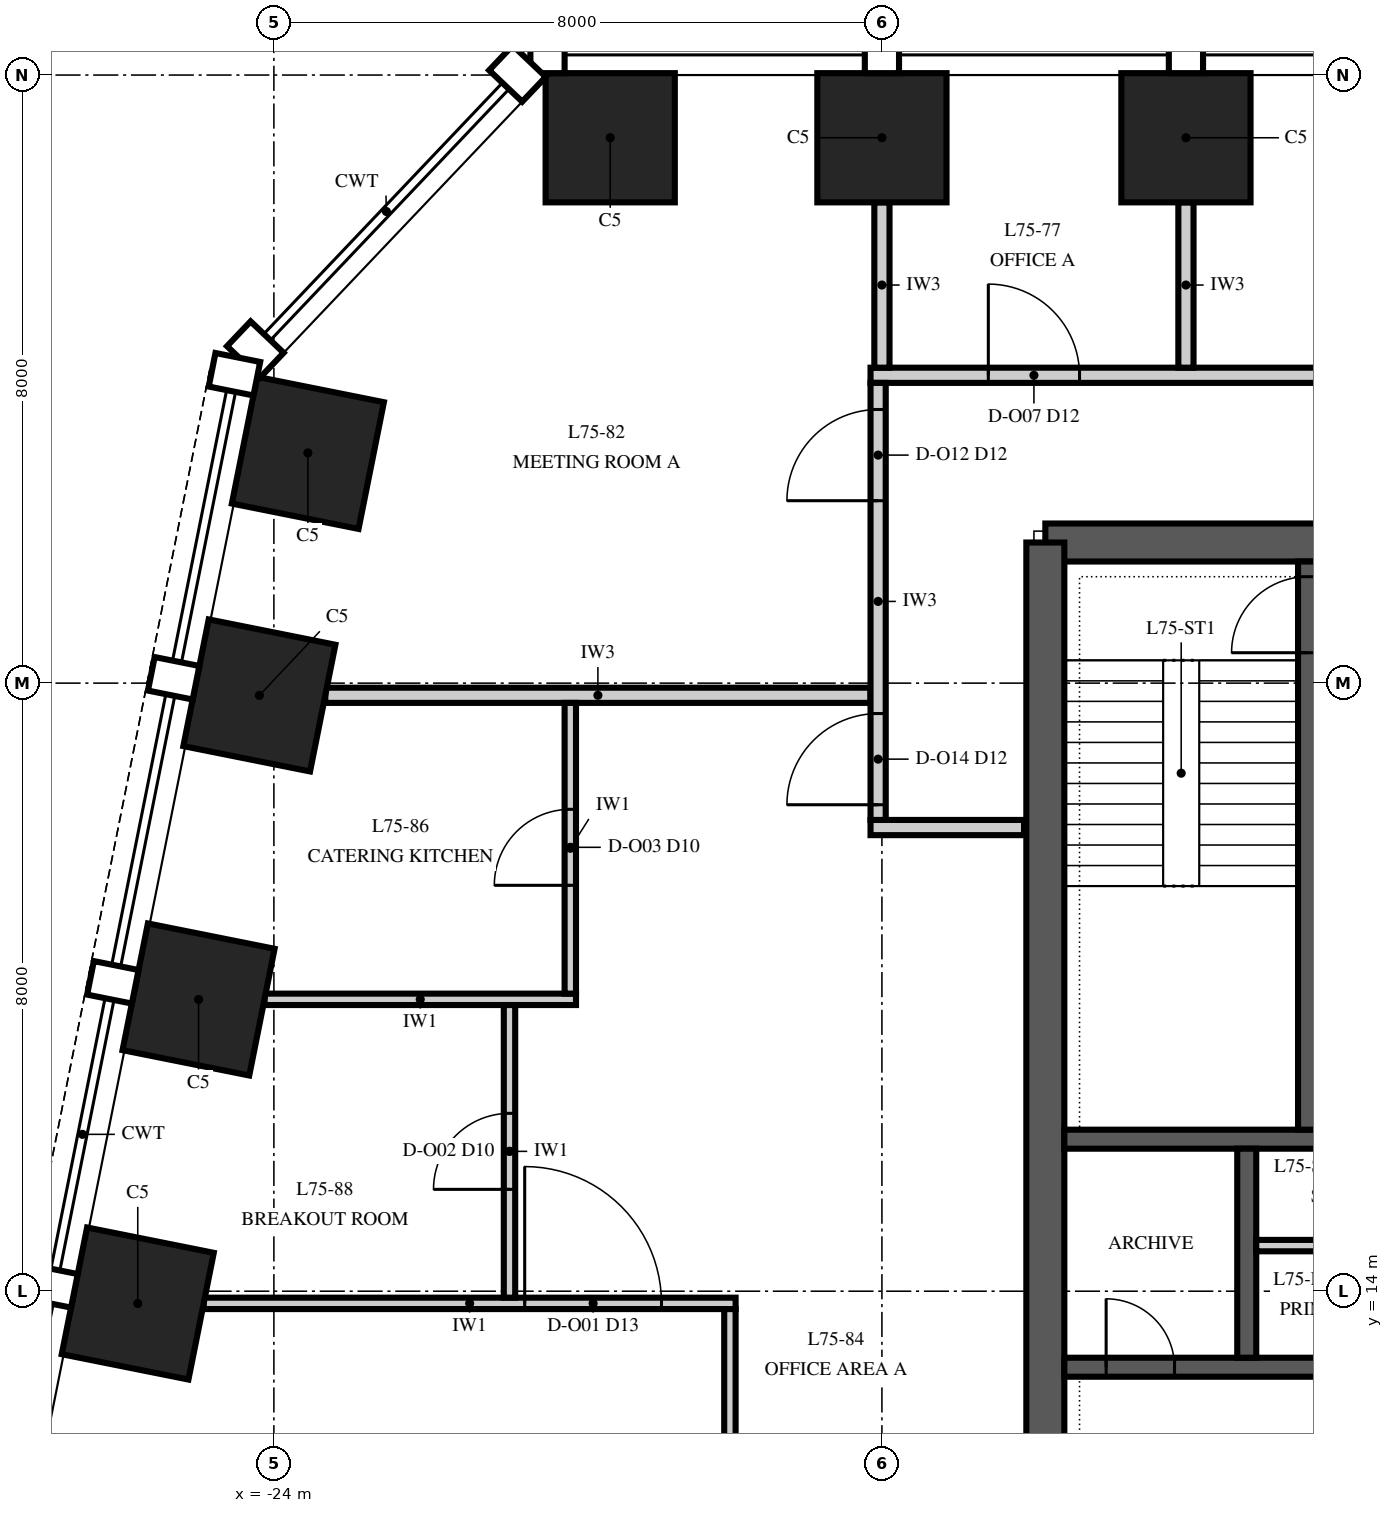
"""IFC4 building model, lengths in metres.
Left out: names, types, materials, properties, quantities, classifications, styles, units other than length and angle.
Written with IfcOpenShell. Run it as: python <this file> out.ifc"""

import sys

from ifc_helpers import new_model, si_unit, direction, frame, frame_2d, origin, origin_2d, place, context, subcontext, project, spatial, polyline, rectangle, outline, extrude, element, fill, save


model = new_model("IFC4")
c1 = context("Model", 3, precision=1e-05, world=origin(), true_north=direction((0.0, 1.0)))
c2 = subcontext(c1, "Body", "Model", "MODEL_VIEW")
j1 = project(units=[si_unit("LENGTHUNIT", "METRE"), si_unit("PLANEANGLEUNIT", "RADIAN")], contexts=[c1])
p1 = place(None, origin())
s1 = spatial("IfcSite", under=j1, at=p1, CompositionType="ELEMENT")
p2 = place(p1, origin())
s2 = spatial("IfcBuilding", under=s1, at=p2, CompositionType="ELEMENT")
p3 = place(p2, frame((0.0, 0.0, 320.0)))
s3 = spatial("IfcBuildingStorey", under=s2, at=p3, CompositionType="ELEMENT", Elevation=320.0)
for number, where, z_axis, x_axis in (
    (1, (-12.0, 29.175, 0.0), (0.0, 0.0, 1.0), (-1.0, 0.0, 0.0)),
    (2, (-16.0, 29.175, 0.0), (0.0, 0.0, 1.0), (-1.0, 0.0, 0.0)),
    (3, (-19.575, 29.175, 0.0), (0.0, 0.0, 1.0), (-1.0, 0.0, 0.0)),
    (4, (-23.553, 25.029, 0.0), (0.0, 0.0, 1.0), (-0.196, -0.981, 0.0)),
    (5, (-24.191, 21.838, 0.0), (0.0, 0.0, 1.0), (-0.196, -0.981, 0.0)),
    (6, (-24.991, 17.838, 0.0), (0.0, 0.0, 1.0), (-0.196, -0.981, 0.0)),
    (7, (-25.791, 13.838, 0.0), (0.0, 0.0, 1.0), (-0.196, -0.981, 0.0)),
):
    element("IfcColumn", number, at=place(p3, frame(where, z_axis=z_axis, x_axis=x_axis)), inside=s3, PredefinedType="COLUMN", context=c2, shape_type="SweptSolid", body=[
        extrude(rectangle(XDim=1.7, YDim=1.7, at=origin_2d()), origin(), (0.0, 0.0, 1.0), 4.0),
    ])
p4 = place(p3, frame((13.85, 23.85, 0.0), z_axis=(0.0, 0.0, 1.0), x_axis=(-1.0, 0.0, 0.0)))
e8 = element("IfcWall", 8, at=p4, inside=s3, PredefinedType="SHEAR", context=c2, shape_type="SweptSolid", body=[
    extrude(rectangle(XDim=27.7, YDim=0.5, at=frame_2d((13.85, 0.0))), origin(), (0.0, 0.0, 1.0), 4.0),
])
p5 = place(p4, frame((21.75, 0.0, 0.0)))
e9 = element("IfcOpeningElement", 9, at=p5, cuts=e8, PredefinedType="OPENING", context=c2, shape_type="SweptSolid", body=[
    extrude(rectangle(XDim=1.0, YDim=2.1, at=frame_2d((0.5, 1.05))), frame((0.0, 0.265, 0.0), z_axis=(0.0, -1.0, 0.0), x_axis=(1.0, 0.0, 0.0)), (0.0, 0.0, 1.0), 0.53),
])
p6 = place(p4, frame((4.95, 0.0, 0.0)))
e10 = element("IfcOpeningElement", 10, at=p6, cuts=e8, PredefinedType="OPENING", context=c2, shape_type="SweptSolid", body=[
    extrude(rectangle(XDim=1.0, YDim=2.1, at=frame_2d((0.5, 1.05))), frame((0.0, 0.265, 0.0), z_axis=(0.0, -1.0, 0.0), x_axis=(1.0, 0.0, 0.0)), (0.0, 0.0, 1.0), 0.53),
])
p7 = place(p4, frame((17.35, 0.0, 0.0)))
e11 = element("IfcOpeningElement", 11, at=p7, cuts=e8, PredefinedType="OPENING", context=c2, shape_type="SweptSolid", body=[
    extrude(rectangle(XDim=1.0, YDim=2.1, at=frame_2d((0.5, 1.05))), frame((0.0, 0.265, 0.0), z_axis=(0.0, -1.0, 0.0), x_axis=(1.0, 0.0, 0.0)), (0.0, 0.0, 1.0), 0.53),
])
p8 = place(p4, frame((13.35, 0.0, 0.0)))
e12 = element("IfcOpeningElement", 12, at=p8, cuts=e8, PredefinedType="OPENING", context=c2, shape_type="SweptSolid", body=[
    extrude(rectangle(XDim=1.0, YDim=2.1, at=frame_2d((0.5, 1.05))), frame((0.0, 0.265, 0.0), z_axis=(0.0, -1.0, 0.0), x_axis=(1.0, 0.0, 0.0)), (0.0, 0.0, 1.0), 0.53),
])
p9 = place(p4, frame((9.35, 0.0, 0.0)))
e13 = element("IfcOpeningElement", 13, at=p9, cuts=e8, PredefinedType="OPENING", context=c2, shape_type="SweptSolid", body=[
    extrude(rectangle(XDim=1.0, YDim=2.1, at=frame_2d((0.5, 1.05))), frame((0.0, 0.265, 0.0), z_axis=(0.0, -1.0, 0.0), x_axis=(1.0, 0.0, 0.0)), (0.0, 0.0, 1.0), 0.53),
])
p10 = place(p3, frame((-13.85, 23.85, 0.0), z_axis=(0.0, 0.0, 1.0), x_axis=(0.0, -1.0, 0.0)))
e14 = element("IfcWall", 14, at=p10, inside=s3, PredefinedType="SHEAR", context=c2, shape_type="SweptSolid", body=[
    extrude(outline(polyline([(0.0, -0.25), (17.7, -0.25), (17.7, 0.0), (17.45, 0.0), (17.45, 0.25), (0.25, 0.25), (0.25, 0.0), (0.0, 0.0), (0.0, -0.25)])), origin(), (0.0, 0.0, 1.0), 4.0),
])
p11 = place(p10, frame((11.75, 0.0, 0.0)))
e15 = element("IfcOpeningElement", 15, at=p11, cuts=e14, PredefinedType="OPENING", context=c2, shape_type="SweptSolid", body=[
    extrude(rectangle(XDim=1.8, YDim=2.4, at=frame_2d((0.9, 1.2))), frame((0.0, 0.265, 0.0), z_axis=(0.0, -1.0, 0.0), x_axis=(1.0, 0.0, 0.0)), (0.0, 0.0, 1.0), 0.53),
])
p12 = place(p3, frame((-13.6, 13.0, 0.0), z_axis=(0.0, 0.0, 1.0), x_axis=(1.0, 0.0, 0.0)))
e16 = element("IfcWall", 16, at=p12, inside=s3, PredefinedType="SHEAR", context=c2, shape_type="SweptSolid", body=[
    extrude(rectangle(XDim=27.2, YDim=0.25, at=frame_2d((13.6, 0.0))), origin(), (0.0, 0.0, 1.0), 4.0),
])
p13 = place(p12, frame((15.95, 0.0, 0.0)))
e17 = element("IfcOpeningElement", 17, at=p13, cuts=e16, PredefinedType="OPENING", context=c2, shape_type="SweptSolid", body=[
    extrude(rectangle(XDim=0.9, YDim=2.1, at=frame_2d((0.45, 1.05))), frame((0.0, 0.14, 0.0), z_axis=(0.0, -1.0, 0.0), x_axis=(1.0, 0.0, 0.0)), (0.0, 0.0, 1.0), 0.28),
])
p14 = place(p12, frame((18.35, 0.0, 0.0)))
e18 = element("IfcOpeningElement", 18, at=p14, cuts=e16, PredefinedType="OPENING", context=c2, shape_type="SweptSolid", body=[
    extrude(rectangle(XDim=0.9, YDim=2.1, at=frame_2d((0.45, 1.05))), frame((0.0, 0.14, 0.0), z_axis=(0.0, -1.0, 0.0), x_axis=(1.0, 0.0, 0.0)), (0.0, 0.0, 1.0), 0.28),
])
p15 = place(p12, frame((21.15, 0.0, 0.0)))
e19 = element("IfcOpeningElement", 19, at=p15, cuts=e16, PredefinedType="OPENING", context=c2, shape_type="SweptSolid", body=[
    extrude(rectangle(XDim=0.9, YDim=2.1, at=frame_2d((0.45, 1.05))), frame((0.0, 0.14, 0.0), z_axis=(0.0, -1.0, 0.0), x_axis=(1.0, 0.0, 0.0)), (0.0, 0.0, 1.0), 0.28),
])
p16 = place(p12, frame((0.55, 0.0, 0.0)))
e20 = element("IfcOpeningElement", 20, at=p16, cuts=e16, PredefinedType="OPENING", context=c2, shape_type="SweptSolid", body=[
    extrude(rectangle(XDim=0.9, YDim=2.1, at=frame_2d((0.45, 1.05))), frame((0.0, 0.14, 0.0), z_axis=(0.0, -1.0, 0.0), x_axis=(1.0, 0.0, 0.0)), (0.0, 0.0, 1.0), 0.28),
])
p17 = place(p12, frame((3.35, 0.0, 0.0)))
e21 = element("IfcOpeningElement", 21, at=p17, cuts=e16, PredefinedType="OPENING", context=c2, shape_type="SweptSolid", body=[
    extrude(rectangle(XDim=0.9, YDim=2.1, at=frame_2d((0.45, 1.05))), frame((0.0, 0.14, 0.0), z_axis=(0.0, -1.0, 0.0), x_axis=(1.0, 0.0, 0.0)), (0.0, 0.0, 1.0), 0.28),
])
p18 = place(p12, frame((6.15, 0.0, 0.0)))
e22 = element("IfcOpeningElement", 22, at=p18, cuts=e16, PredefinedType="OPENING", context=c2, shape_type="SweptSolid", body=[
    extrude(rectangle(XDim=0.9, YDim=2.1, at=frame_2d((0.45, 1.05))), frame((0.0, 0.14, 0.0), z_axis=(0.0, -1.0, 0.0), x_axis=(1.0, 0.0, 0.0)), (0.0, 0.0, 1.0), 0.28),
])
p19 = place(p3, frame((-13.6, 16.0, 0.0), z_axis=(0.0, 0.0, 1.0), x_axis=(1.0, 0.0, 0.0)))
e23 = element("IfcWall", 23, at=p19, inside=s3, PredefinedType="SHEAR", context=c2, shape_type="SweptSolid", body=[
    extrude(rectangle(XDim=27.2, YDim=0.25, at=frame_2d((13.6, 0.0))), origin(), (0.0, 0.0, 1.0), 4.0),
])
p20 = place(p3, frame((-11.2, 13.125, 0.0), z_axis=(0.0, 0.0, 1.0), x_axis=(0.0, 1.0, 0.0)))
e24 = element("IfcWall", 24, at=p20, inside=s3, PredefinedType="SHEAR", context=c2, shape_type="SweptSolid", body=[
    extrude(rectangle(XDim=2.75, YDim=0.25, at=frame_2d((1.375, 0.0))), origin(), (0.0, 0.0, 1.0), 4.0),
])
p21 = place(p3, frame((-10.4, 16.125, 0.0), z_axis=(0.0, 0.0, 1.0), x_axis=(0.0, 1.0, 0.0)))
e25 = element("IfcWall", 25, at=p21, inside=s3, PredefinedType="SHEAR", context=c2, shape_type="SweptSolid", body=[
    extrude(rectangle(XDim=7.475, YDim=0.25, at=frame_2d((3.738, 0.0))), origin(), (0.0, 0.0, 1.0), 4.0),
])
p22 = place(p21, frame((6.275, 0.0, 0.0)))
e26 = element("IfcOpeningElement", 26, at=p22, cuts=e25, PredefinedType="OPENING", context=c2, shape_type="SweptSolid", body=[
    extrude(rectangle(XDim=1.0, YDim=2.1, at=frame_2d((0.5, 1.05))), frame((0.0, 0.14, 0.0), z_axis=(0.0, -1.0, 0.0), x_axis=(1.0, 0.0, 0.0)), (0.0, 0.0, 1.0), 0.28),
])
p23 = place(p3, frame((-11.075, 14.6, 0.0), z_axis=(0.0, 0.0, 1.0), x_axis=(1.0, 0.0, 0.0)))
e27 = element("IfcWall", 27, at=p23, inside=s3, PredefinedType="PARTITIONING", context=c2, shape_type="SweptSolid", body=[
    extrude(rectangle(XDim=2.55, YDim=0.15, at=frame_2d((1.275, 0.0))), origin(), (0.0, 0.0, 1.0), 3.85),
])
p24 = place(p23, frame((0.825, 0.0, 0.0)))
e28 = element("IfcOpeningElement", 28, at=p24, cuts=e27, PredefinedType="OPENING", context=c2, shape_type="SweptSolid", body=[
    extrude(rectangle(XDim=0.9, YDim=2.1, at=frame_2d((0.45, 1.05))), frame((0.0, 0.09, 0.0), z_axis=(0.0, -1.0, 0.0), x_axis=(1.0, 0.0, 0.0)), (0.0, 0.0, 1.0), 0.18),
])
p25 = place(p3, frame((-24.924, 13.84, 0.0), z_axis=(0.0, 0.0, 1.0), x_axis=(1.0, 0.0, 0.0)))
e29 = element("IfcWall", 29, at=p25, inside=s3, PredefinedType="PARTITIONING", context=c2, shape_type="SweptSolid", body=[
    extrude(rectangle(XDim=6.999, YDim=0.15, at=frame_2d((3.5, 0.0))), origin(), (0.0, 0.0, 1.0), 3.13),
])
p26 = place(p25, frame((4.224, 0.0, 0.0)))
e30 = element("IfcOpeningElement", 30, at=p26, cuts=e29, PredefinedType="OPENING", context=c2, shape_type="SweptSolid", body=[
    extrude(rectangle(XDim=1.8, YDim=2.4, at=frame_2d((0.9, 1.2))), frame((0.0, 0.09, 0.0), z_axis=(0.0, -1.0, 0.0), x_axis=(1.0, 0.0, 0.0)), (0.0, 0.0, 1.0), 0.18),
])
p27 = place(p3, frame((-24.124, 17.84, 0.0), z_axis=(0.0, 0.0, 1.0), x_axis=(1.0, 0.0, 0.0)))
e31 = element("IfcWall", 31, at=p27, inside=s3, PredefinedType="PARTITIONING", context=c2, shape_type="SweptSolid", body=[
    extrude(rectangle(XDim=4.099, YDim=0.15, at=frame_2d((2.049, 0.0))), origin(), (0.0, 0.0, 1.0), 3.13),
])
p28 = place(p3, frame((-16.15, 20.1, 0.0), z_axis=(0.0, 0.0, 1.0), x_axis=(1.0, 0.0, 0.0)))
e32 = element("IfcWall", 32, at=p28, inside=s3, PredefinedType="PARTITIONING", context=c2, shape_type="SweptSolid", body=[
    extrude(rectangle(XDim=2.02, YDim=0.2, at=frame_2d((1.01, 0.0))), origin(), (0.0, 0.0, 1.0), 3.75),
])
p29 = place(p3, frame((-23.324, 21.84, 0.0), z_axis=(0.0, 0.0, 1.0), x_axis=(1.0, 0.0, 0.0)))
e33 = element("IfcWall", 33, at=p29, inside=s3, PredefinedType="PARTITIONING", context=c2, shape_type="SweptSolid", body=[
    extrude(rectangle(XDim=7.174, YDim=0.2, at=frame_2d((3.587, 0.0))), origin(), (0.0, 0.0, 1.0), 3.13),
])
p30 = place(p3, frame((-16.15, 26.05, 0.0), z_axis=(0.0, 0.0, 1.0), x_axis=(1.0, 0.0, 0.0)))
e34 = element("IfcWall", 34, at=p30, inside=s3, PredefinedType="PARTITIONING", context=c2, shape_type="SweptSolid", body=[
    extrude(rectangle(XDim=32.3, YDim=0.2, at=frame_2d((16.15, 0.0))), origin(), (0.0, 0.0, 1.0), 3.318),
])
p31 = place(p30, frame((1.55, 0.0, 0.0)))
e35 = element("IfcOpeningElement", 35, at=p31, cuts=e34, PredefinedType="OPENING", context=c2, shape_type="SweptSolid", body=[
    extrude(rectangle(XDim=1.2, YDim=2.4, at=frame_2d((0.6, 1.2))), frame((0.0, 0.115, 0.0), z_axis=(0.0, -1.0, 0.0), x_axis=(1.0, 0.0, 0.0)), (0.0, 0.0, 1.0), 0.23),
])
p32 = place(p30, frame((7.55, 0.0, 0.0)))
e36 = element("IfcOpeningElement", 36, at=p32, cuts=e34, PredefinedType="OPENING", context=c2, shape_type="SweptSolid", body=[
    extrude(rectangle(XDim=1.2, YDim=2.4, at=frame_2d((0.6, 1.2))), frame((0.0, 0.115, 0.0), z_axis=(0.0, -1.0, 0.0), x_axis=(1.0, 0.0, 0.0)), (0.0, 0.0, 1.0), 0.23),
])
p33 = place(p30, frame((15.55, 0.0, 0.0)))
e37 = element("IfcOpeningElement", 37, at=p33, cuts=e34, PredefinedType="OPENING", context=c2, shape_type="SweptSolid", body=[
    extrude(rectangle(XDim=1.2, YDim=2.4, at=frame_2d((0.6, 1.2))), frame((0.0, 0.115, 0.0), z_axis=(0.0, -1.0, 0.0), x_axis=(1.0, 0.0, 0.0)), (0.0, 0.0, 1.0), 0.23),
])
p34 = place(p30, frame((23.55, 0.0, 0.0)))
e38 = element("IfcOpeningElement", 38, at=p34, cuts=e34, PredefinedType="OPENING", context=c2, shape_type="SweptSolid", body=[
    extrude(rectangle(XDim=1.2, YDim=2.4, at=frame_2d((0.6, 1.2))), frame((0.0, 0.115, 0.0), z_axis=(0.0, -1.0, 0.0), x_axis=(1.0, 0.0, 0.0)), (0.0, 0.0, 1.0), 0.23),
])
p35 = place(p30, frame((29.55, 0.0, 0.0)))
e39 = element("IfcOpeningElement", 39, at=p35, cuts=e34, PredefinedType="OPENING", context=c2, shape_type="SweptSolid", body=[
    extrude(rectangle(XDim=1.2, YDim=2.4, at=frame_2d((0.6, 1.2))), frame((0.0, 0.115, 0.0), z_axis=(0.0, -1.0, 0.0), x_axis=(1.0, 0.0, 0.0)), (0.0, 0.0, 1.0), 0.23),
])
p36 = place(p3, frame((-20.9, 13.915, 0.0), z_axis=(0.0, 0.0, 1.0), x_axis=(0.0, 1.0, 0.0)))
e40 = element("IfcWall", 40, at=p36, inside=s3, PredefinedType="PARTITIONING", context=c2, shape_type="SweptSolid", body=[
    extrude(rectangle(XDim=3.85, YDim=0.15, at=frame_2d((1.925, 0.0))), origin(), (0.0, 0.0, 1.0), 3.13),
])
p37 = place(p36, frame((1.425, 0.0, 0.0)))
e41 = element("IfcOpeningElement", 41, at=p37, cuts=e40, PredefinedType="OPENING", context=c2, shape_type="SweptSolid", body=[
    extrude(rectangle(XDim=1.0, YDim=2.3, at=frame_2d((0.5, 1.15))), frame((0.0, 0.09, 0.0), z_axis=(0.0, -1.0, 0.0), x_axis=(1.0, 0.0, 0.0)), (0.0, 0.0, 1.0), 0.18),
])
p38 = place(p3, frame((-20.1, 17.915, 0.0), z_axis=(0.0, 0.0, 1.0), x_axis=(0.0, 1.0, 0.0)))
e42 = element("IfcWall", 42, at=p38, inside=s3, PredefinedType="PARTITIONING", context=c2, shape_type="SweptSolid", body=[
    extrude(rectangle(XDim=3.825, YDim=0.15, at=frame_2d((1.913, 0.0))), origin(), (0.0, 0.0, 1.0), 3.13),
])
p39 = place(p38, frame((1.425, 0.0, 0.0)))
e43 = element("IfcOpeningElement", 43, at=p39, cuts=e42, PredefinedType="OPENING", context=c2, shape_type="SweptSolid", body=[
    extrude(rectangle(XDim=1.0, YDim=2.3, at=frame_2d((0.5, 1.15))), frame((0.0, 0.09, 0.0), z_axis=(0.0, -1.0, 0.0), x_axis=(1.0, 0.0, 0.0)), (0.0, 0.0, 1.0), 0.18),
])
p40 = place(p3, frame((-18.0, 3.675, 0.0), z_axis=(0.0, 0.0, 1.0), x_axis=(0.0, 1.0, 0.0)))
e44 = element("IfcWall", 44, at=p40, inside=s3, PredefinedType="PARTITIONING", context=c2, shape_type="SweptSolid", body=[
    extrude(rectangle(XDim=10.09, YDim=0.15, at=frame_2d((5.045, 0.0))), origin(), (0.0, 0.0, 1.0), 2.742),
])
p41 = place(p3, frame((-16.05, 20.2, 0.0), z_axis=(0.0, 0.0, 1.0), x_axis=(0.0, 1.0, 0.0)))
e45 = element("IfcWall", 45, at=p41, inside=s3, PredefinedType="PARTITIONING", context=c2, shape_type="SweptSolid", body=[
    extrude(rectangle(XDim=5.75, YDim=0.2, at=frame_2d((2.875, 0.0))), origin(), (0.0, 0.0, 1.0), 3.13),
])
p42 = place(p41, frame((4.2, 0.0, 0.0)))
e46 = element("IfcOpeningElement", 46, at=p42, cuts=e45, PredefinedType="OPENING", context=c2, shape_type="SweptSolid", body=[
    extrude(rectangle(XDim=1.2, YDim=2.4, at=frame_2d((0.6, 1.2))), frame((0.0, 0.115, 0.0), z_axis=(0.0, -1.0, 0.0), x_axis=(1.0, 0.0, 0.0)), (0.0, 0.0, 1.0), 0.23),
])
p43 = place(p41, frame((0.2, 0.0, 0.0)))
e47 = element("IfcOpeningElement", 47, at=p43, cuts=e45, PredefinedType="OPENING", context=c2, shape_type="SweptSolid", body=[
    extrude(rectangle(XDim=1.2, YDim=2.4, at=frame_2d((0.6, 1.2))), frame((0.0, 0.115, 0.0), z_axis=(0.0, -1.0, 0.0), x_axis=(1.0, 0.0, 0.0)), (0.0, 0.0, 1.0), 0.23),
])
for number, where, z_axis, x_axis in (
    (48, (-16.0, 26.15, 0.0), (0.0, 0.0, 1.0), (0.0, 1.0, 0.0)),
    (49, (-12.0, 26.15, 0.0), (0.0, 0.0, 1.0), (0.0, 1.0, 0.0)),
):
    element("IfcWall", number, at=place(p3, frame(where, z_axis=z_axis, x_axis=x_axis)), inside=s3, PredefinedType="PARTITIONING", context=c2, shape_type="SweptSolid", body=[
        extrude(rectangle(XDim=2.175, YDim=0.2, at=frame_2d((1.087, 0.0))), origin(), (0.0, 0.0, 1.0), 3.318),
    ])
p44 = place(p22, origin())
e50 = element("IfcDoor", 50, at=p44, inside=s3, OperationType="SINGLE_SWING_LEFT", PredefinedType="DOOR", context=c2, shape_type="SweptSolid", body=[
    extrude(rectangle(XDim=1.0, YDim=2.1, at=frame_2d((0.5, 1.05))), frame((0.0, 0.125, 0.0), z_axis=(0.0, -1.0, 0.0), x_axis=(1.0, 0.0, 0.0)), (0.0, 0.0, 1.0), 0.25),
])
fill(e26, e50)
p45 = place(p16, origin())
e51 = element("IfcDoor", 51, at=p45, inside=s3, OperationType="SINGLE_SWING_LEFT", PredefinedType="DOOR", context=c2, shape_type="SweptSolid", body=[
    extrude(rectangle(XDim=0.9, YDim=2.1, at=frame_2d((0.45, 1.05))), frame((0.0, 0.125, 0.0), z_axis=(0.0, -1.0, 0.0), x_axis=(1.0, 0.0, 0.0)), (0.0, 0.0, 1.0), 0.25),
])
fill(e20, e51)
p46 = place(p26, origin())
e52 = element("IfcDoor", 52, at=p46, inside=s3, OperationType="DOUBLE_DOOR_SINGLE_SWING", PredefinedType="DOOR", context=c2, shape_type="SweptSolid", body=[
    extrude(rectangle(XDim=1.8, YDim=2.4, at=frame_2d((0.9, 1.2))), frame((0.0, 0.075, 0.0), z_axis=(0.0, -1.0, 0.0), x_axis=(1.0, 0.0, 0.0)), (0.0, 0.0, 1.0), 0.149),
])
fill(e30, e52)
p47 = place(p37, origin())
e53 = element("IfcDoor", 53, at=p47, inside=s3, OperationType="SINGLE_SWING_LEFT", PredefinedType="DOOR", context=c2, shape_type="SweptSolid", body=[
    extrude(rectangle(XDim=1.0, YDim=2.3, at=frame_2d((0.5, 1.15))), frame((0.0, 0.075, 0.0), z_axis=(0.0, -1.0, 0.0), x_axis=(1.0, 0.0, 0.0)), (0.0, 0.0, 1.0), 0.149),
])
fill(e41, e53)
p48 = place(p39, origin())
e54 = element("IfcDoor", 54, at=p48, inside=s3, OperationType="SINGLE_SWING_LEFT", PredefinedType="DOOR", context=c2, shape_type="SweptSolid", body=[
    extrude(rectangle(XDim=1.0, YDim=2.3, at=frame_2d((0.5, 1.15))), frame((0.0, 0.075, 0.0), z_axis=(0.0, -1.0, 0.0), x_axis=(1.0, 0.0, 0.0)), (0.0, 0.0, 1.0), 0.149),
])
fill(e43, e54)
p49 = place(p31, origin())
e55 = element("IfcDoor", 55, at=p49, inside=s3, OperationType="SINGLE_SWING_LEFT", PredefinedType="DOOR", context=c2, shape_type="SweptSolid", body=[
    extrude(rectangle(XDim=1.2, YDim=2.4, at=frame_2d((0.6, 1.2))), frame((0.0, 0.1, 0.0), z_axis=(0.0, -1.0, 0.0), x_axis=(1.0, 0.0, 0.0)), (0.0, 0.0, 1.0), 0.199),
])
fill(e35, e55)
p50 = place(p42, origin())
e56 = element("IfcDoor", 56, at=p50, inside=s3, OperationType="SINGLE_SWING_LEFT", PredefinedType="DOOR", context=c2, shape_type="SweptSolid", body=[
    extrude(rectangle(XDim=1.2, YDim=2.4, at=frame_2d((0.6, 1.2))), frame((0.0, 0.1, 0.0), z_axis=(0.0, -1.0, 0.0), x_axis=(1.0, 0.0, 0.0)), (0.0, 0.0, 1.0), 0.199),
])
fill(e46, e56)
p51 = place(p43, origin())
e57 = element("IfcDoor", 57, at=p51, inside=s3, OperationType="SINGLE_SWING_LEFT", PredefinedType="DOOR", context=c2, shape_type="SweptSolid", body=[
    extrude(rectangle(XDim=1.2, YDim=2.4, at=frame_2d((0.6, 1.2))), frame((0.0, 0.1, 0.0), z_axis=(0.0, -1.0, 0.0), x_axis=(1.0, 0.0, 0.0)), (0.0, 0.0, 1.0), 0.199),
])
fill(e47, e57)
save(model, sys.argv[1])
